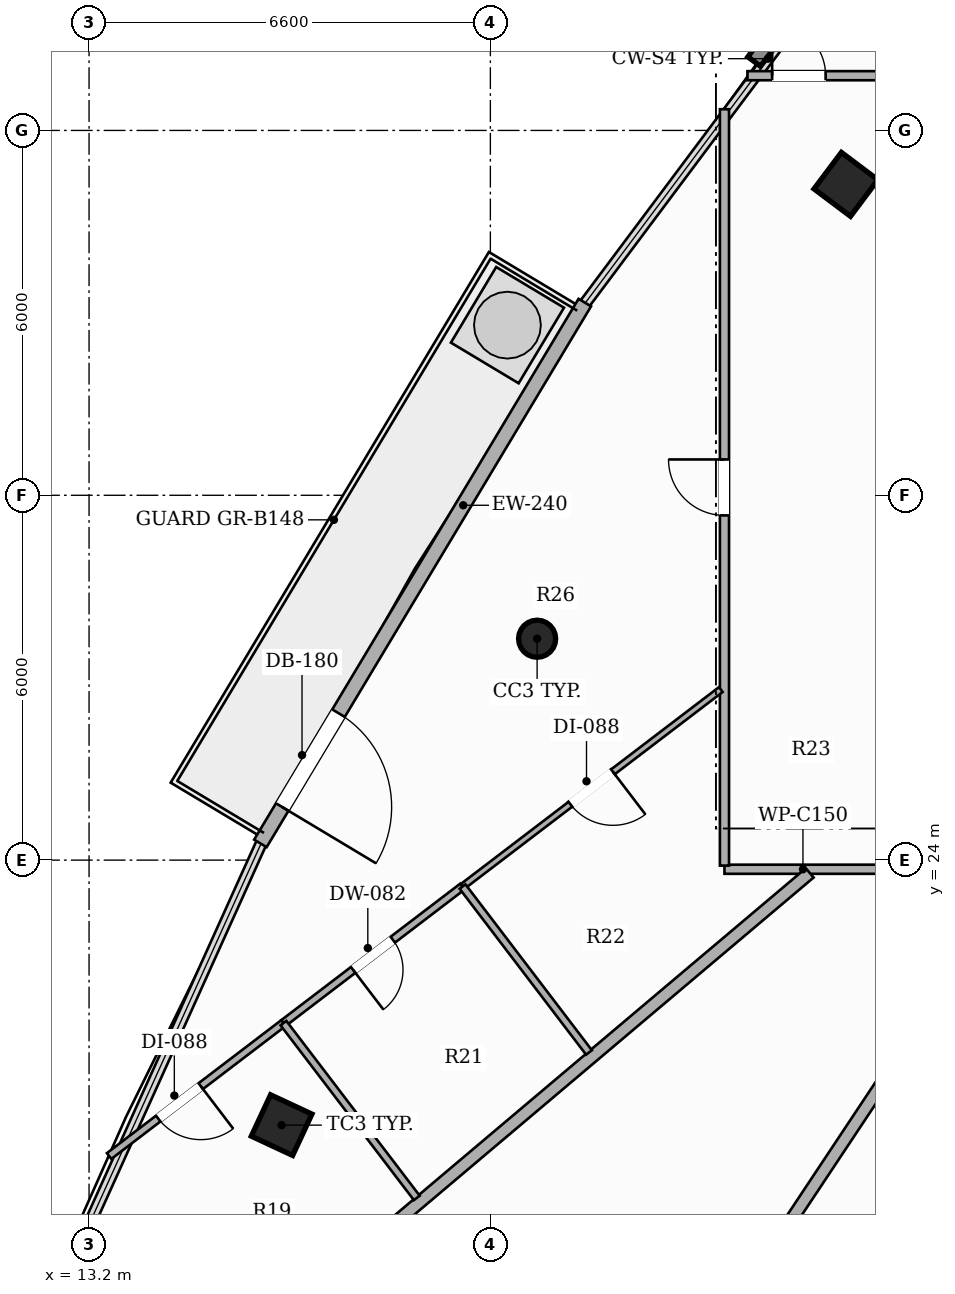
"""IFC4 building model, lengths in metres.
Left out: names, types, materials, properties, quantities, classifications, styles, units other than length and angle.
Written with IfcOpenShell. Run it as: python <this file> out.ifc"""

import sys

from ifc_helpers import new_model, si_unit, direction, frame, frame_2d, origin, origin_2d, place, context, subcontext, project, spatial, rectangle, hollow_rectangle, hollow_circle, extrude, element, fill, save


model = new_model("IFC4")
c1 = context("Model", 3, precision=1e-05, world=origin(), true_north=direction((0.0, 1.0)))
c2 = subcontext(c1, "Body", "Model", "MODEL_VIEW")
j1 = project(units=[si_unit("LENGTHUNIT", "METRE"), si_unit("PLANEANGLEUNIT", "RADIAN")], contexts=[c1])
p1 = place(None, origin())
s1 = spatial("IfcSite", under=j1, at=p1, CompositionType="ELEMENT")
p2 = place(p1, origin())
s2 = spatial("IfcBuilding", under=s1, at=p2, CompositionType="ELEMENT")
p3 = place(p2, frame((0.0, 0.0, 212.9)))
s3 = spatial("IfcBuildingStorey", under=s2, at=p3, CompositionType="ELEMENT", Elevation=212.9)
p4 = place(p3, frame((25.648, 35.113, 0.0), z_axis=(0.0, 0.0, 1.0), x_axis=(0.600420225326, 0.799684658487, 0.0)))
e1 = element("IfcColumn", 1, at=p4, inside=s3, PredefinedType="COLUMN", context=c2, shape_type="SweptSolid", body=[
    extrude(hollow_rectangle(XDim=0.75, YDim=0.75, WallThickness=0.025, at=origin_2d()), origin(), (0.0, 0.0, 1.0), 3.3),
])
p5 = place(p3, frame((20.569, 27.641, 0.0), z_axis=(0.0, 0.0, 1.0), x_axis=(1.0, 0.0, 0.0)))
e2 = element("IfcColumn", 2, at=p5, inside=s3, PredefinedType="COLUMN", context=c2, shape_type="SweptSolid", body=[
    extrude(hollow_circle(Radius=0.305, WallThickness=0.016, at=origin_2d()), origin(), (0.0, 0.0, 1.0), 3.3),
])
p6 = place(p3, frame((16.367, 19.642, 0.0), z_axis=(0.0, 0.0, 1.0), x_axis=(0.422618261741, 0.906307787037, 0.0)))
e3 = element("IfcColumn", 3, at=p6, inside=s3, PredefinedType="COLUMN", context=c2, shape_type="SweptSolid", body=[
    extrude(hollow_rectangle(XDim=0.75, YDim=0.75, WallThickness=0.025, at=origin_2d()), origin(), (0.0, 0.0, 1.0), 3.3),
])
p7 = place(p3, frame((21.353, 33.169, 0.0), z_axis=(0.0, 0.0, 1.0), x_axis=(-0.514391899557, -0.857555230682, 0.0)))
e4 = element("IfcWall", 4, at=p7, inside=s3, PredefinedType="SOLIDWALL", context=c2, shape_type="SweptSolid", body=[
    extrude(rectangle(XDim=10.371, YDim=0.24, at=frame_2d((5.186, 0.0))), origin(), (0.0, 0.0, 1.0), 2.624),
])
p8 = place(p7, frame((7.874, 0.0, 0.0)))
e5 = element("IfcOpeningElement", 5, at=p8, cuts=e4, PredefinedType="OPENING", context=c2, shape_type="SweptSolid", body=[
    extrude(rectangle(XDim=1.8, YDim=2.2, at=frame_2d((0.9, 1.1))), frame((0.0, 0.13, 0.0), z_axis=(0.0, -1.0, 0.0), x_axis=(1.0, 0.0, 0.0)), (0.0, 0.0, 1.0), 0.26),
])
p9 = place(p3, frame((32.05, 23.85, 0.0), z_axis=(0.0, 0.0, 1.0), x_axis=(-1.0, 0.0, 0.0)))
e6 = element("IfcWall", 6, at=p9, inside=s3, PredefinedType="PARTITIONING", context=c2, shape_type="SweptSolid", body=[
    extrude(rectangle(XDim=8.4, YDim=0.15, at=frame_2d((4.2, 0.0))), origin(), (0.0, 0.0, 1.0), 2.565),
])
p10 = place(p9, frame((1.446, 0.0, 0.0)))
e7 = element("IfcOpeningElement", 7, at=p10, cuts=e6, PredefinedType="OPENING", context=c2, shape_type="SweptSolid", body=[
    extrude(rectangle(XDim=0.92, YDim=2.15, at=frame_2d((0.46, 1.075))), frame((0.0, 0.085, 0.0), z_axis=(0.0, -1.0, 0.0), x_axis=(1.0, 0.0, 0.0)), (0.0, 0.0, 1.0), 0.17),
])
p11 = place(p9, frame((4.798, 0.0, 0.0)))
e8 = element("IfcOpeningElement", 8, at=p11, cuts=e6, PredefinedType="OPENING", context=c2, shape_type="SweptSolid", body=[
    extrude(rectangle(XDim=0.92, YDim=2.15, at=frame_2d((0.46, 1.075))), frame((0.0, 0.085, 0.0), z_axis=(0.0, -1.0, 0.0), x_axis=(1.0, 0.0, 0.0)), (0.0, 0.0, 1.0), 0.17),
])
p12 = place(p3, frame((23.65, 23.91, 0.0), z_axis=(0.0, 0.0, 1.0), x_axis=(0.0, 1.0, 0.0)))
e9 = element("IfcWall", 9, at=p12, inside=s3, PredefinedType="PARTITIONING", context=c2, shape_type="SweptSolid", body=[
    extrude(rectangle(XDim=12.439, YDim=0.15, at=frame_2d((6.22, 0.0))), origin(), (0.0, 0.0, 1.0), 2.492),
])
p13 = place(p12, frame((5.759, 0.0, 0.0)))
e10 = element("IfcOpeningElement", 10, at=p13, cuts=e9, PredefinedType="OPENING", context=c2, shape_type="SweptSolid", body=[
    extrude(rectangle(XDim=0.92, YDim=2.15, at=frame_2d((0.46, 1.075))), frame((0.0, 0.085, 0.0), z_axis=(0.0, -1.0, 0.0), x_axis=(1.0, 0.0, 0.0)), (0.0, 0.0, 1.0), 0.17),
])
p14 = place(p3, frame((24.028, 36.9, 0.0), z_axis=(0.0, 0.0, 1.0), x_axis=(1.0, 0.0, 0.0)))
e11 = element("IfcWall", 11, at=p14, inside=s3, PredefinedType="PARTITIONING", context=c2, shape_type="SweptSolid", body=[
    extrude(rectangle(XDim=2.122, YDim=0.15, at=frame_2d((1.061, 0.0))), origin(), (0.0, 0.0, 1.0), 2.619),
])
p15 = place(p14, frame((0.406, 0.0, 0.0)))
e12 = element("IfcOpeningElement", 12, at=p15, cuts=e11, PredefinedType="OPENING", context=c2, shape_type="SweptSolid", body=[
    extrude(rectangle(XDim=0.88, YDim=2.1, at=frame_2d((0.44, 1.05))), frame((0.0, 0.085, 0.0), z_axis=(0.0, -1.0, 0.0), x_axis=(1.0, 0.0, 0.0)), (0.0, 0.0, 1.0), 0.17),
])
p16 = place(p3, frame((16.618, 5.846, 0.0), z_axis=(0.0, 0.0, 1.0), x_axis=(0.553425992232, 0.832898355817, 0.0)))
e13 = element("IfcWall", 13, at=p16, inside=s3, PredefinedType="PARTITIONING", context=c2, shape_type="SweptSolid", body=[
    extrude(rectangle(XDim=21.544, YDim=0.2, at=frame_2d((10.772, 0.0))), origin(), (0.0, 0.0, 1.0), 2.492),
])
p17 = place(p3, frame((10.087, 11.156, 0.0), z_axis=(0.0, 0.0, 1.0), x_axis=(0.76410924632, 0.645086862127, 0.0)))
e14 = element("IfcWall", 14, at=p17, inside=s3, PredefinedType="PARTITIONING", context=c2, shape_type="SweptSolid", body=[
    extrude(rectangle(XDim=19.585, YDim=0.2, at=frame_2d((9.792, 0.0))), origin(), (0.0, 0.0, 1.0), 2.492),
])
p18 = place(p3, frame((19.342, 23.566, 0.0), z_axis=(0.0, 0.0, 1.0), x_axis=(-0.795172892053, -0.606382776589, 0.0)))
e15 = element("IfcWall", 15, at=p18, inside=s3, PredefinedType="PARTITIONING", context=c2, shape_type="SweptSolid", body=[
    extrude(rectangle(XDim=3.704, YDim=0.12, at=frame_2d((1.852, 0.0))), origin(), (0.0, 0.0, 1.0), 2.492),
])
p19 = place(p18, frame((1.442, 0.0, 0.0)))
e16 = element("IfcOpeningElement", 16, at=p19, cuts=e15, PredefinedType="OPENING", context=c2, shape_type="SweptSolid", body=[
    extrude(rectangle(XDim=0.82, YDim=2.1, at=frame_2d((0.41, 1.05))), frame((0.0, 0.07, 0.0), z_axis=(0.0, -1.0, 0.0), x_axis=(1.0, 0.0, 0.0)), (0.0, 0.0, 1.0), 0.14),
])
p20 = place(p3, frame((16.397, 21.32, 0.0), z_axis=(0.0, 0.0, 1.0), x_axis=(-0.795204709159, -0.606341051333, 0.0)))
e17 = element("IfcWall", 17, at=p20, inside=s3, PredefinedType="PARTITIONING", context=c2, shape_type="SweptSolid", body=[
    extrude(rectangle(XDim=3.605, YDim=0.12, at=frame_2d((1.803, 0.0))), origin(), (0.0, 0.0, 1.0), 3.06),
])
p21 = place(p20, frame((1.71, 0.0, 0.0)))
e18 = element("IfcOpeningElement", 18, at=p21, cuts=e17, PredefinedType="OPENING", context=c2, shape_type="SweptSolid", body=[
    extrude(rectangle(XDim=0.88, YDim=2.1, at=frame_2d((0.44, 1.05))), frame((0.0, 0.07, 0.0), z_axis=(0.0, -1.0, 0.0), x_axis=(1.0, 0.0, 0.0)), (0.0, 0.0, 1.0), 0.14),
])
p22 = place(p3, frame((23.59, 26.805, 0.0), z_axis=(0.0, 0.0, 1.0), x_axis=(-0.795214502583, -0.606328207228, 0.0)))
e19 = element("IfcWall", 19, at=p22, inside=s3, PredefinedType="PARTITIONING", context=c2, shape_type="SweptSolid", body=[
    extrude(rectangle(XDim=5.342, YDim=0.1, at=frame_2d((2.671, 0.0))), origin(), (0.0, 0.0, 1.0), 2.773),
])
p23 = place(p22, frame((2.231, 0.0, 0.0)))
e20 = element("IfcOpeningElement", 20, at=p23, cuts=e19, PredefinedType="OPENING", context=c2, shape_type="SweptSolid", body=[
    extrude(rectangle(XDim=0.88, YDim=2.1, at=frame_2d((0.44, 1.05))), frame((0.0, 0.06, 0.0), z_axis=(0.0, -1.0, 0.0), x_axis=(1.0, 0.0, 0.0)), (0.0, 0.0, 1.0), 0.12),
])
p24 = place(p3, frame((18.59, 18.445, 0.0), z_axis=(0.0, 0.0, 1.0), x_axis=(-0.606504882674, 0.795079761591, 0.0)))
e21 = element("IfcWall", 21, at=p24, inside=s3, PredefinedType="PARTITIONING", context=c2, shape_type="SweptSolid", body=[
    extrude(rectangle(XDim=3.616, YDim=0.12, at=frame_2d((1.808, 0.0))), origin(), (0.0, 0.0, 1.0), 2.492),
])
p25 = place(p3, frame((19.342, 23.566, 0.0), z_axis=(0.0, 0.0, 1.0), x_axis=(0.60619754922, -0.795314108589, 0.0)))
e22 = element("IfcWall", 22, at=p25, inside=s3, PredefinedType="PARTITIONING", context=c2, shape_type="SweptSolid", body=[
    extrude(rectangle(XDim=3.431, YDim=0.12, at=frame_2d((1.716, 0.0))), origin(), (0.0, 0.0, 1.0), 2.773),
])
p26 = place(p8, origin())
e23 = element("IfcDoor", 23, at=p26, inside=s3, OperationType="SINGLE_SWING_RIGHT", PredefinedType="DOOR", context=c2, shape_type="SweptSolid", body=[
    extrude(rectangle(XDim=1.8, YDim=2.2, at=frame_2d((0.9, 1.1))), frame((0.0, 0.025, 0.0), z_axis=(0.0, -1.0, 0.0), x_axis=(1.0, 0.0, 0.0)), (0.0, 0.0, 1.0), 0.05),
])
fill(e5, e23)
p27 = place(p13, origin())
e24 = element("IfcDoor", 24, at=p27, inside=s3, OperationType="SINGLE_SWING_RIGHT", PredefinedType="DOOR", context=c2, shape_type="SweptSolid", body=[
    extrude(rectangle(XDim=0.92, YDim=2.15, at=frame_2d((0.46, 1.075))), frame((0.0, 0.025, 0.0), z_axis=(0.0, -1.0, 0.0), x_axis=(1.0, 0.0, 0.0)), (0.0, 0.0, 1.0), 0.05),
])
fill(e10, e24)
p28 = place(p19, origin())
e25 = element("IfcDoor", 25, at=p28, inside=s3, OperationType="SINGLE_SWING_RIGHT", PredefinedType="DOOR", context=c2, shape_type="SweptSolid", body=[
    extrude(rectangle(XDim=0.82, YDim=2.1, at=frame_2d((0.41, 1.05))), frame((0.0, 0.025, 0.0), z_axis=(0.0, -1.0, 0.0), x_axis=(1.0, 0.0, 0.0)), (0.0, 0.0, 1.0), 0.05),
])
fill(e16, e25)
p29 = place(p21, origin())
e26 = element("IfcDoor", 26, at=p29, inside=s3, OperationType="SINGLE_SWING_LEFT", PredefinedType="DOOR", context=c2, shape_type="SweptSolid", body=[
    extrude(rectangle(XDim=0.88, YDim=2.1, at=frame_2d((0.44, 1.05))), frame((0.0, 0.025, 0.0), z_axis=(0.0, -1.0, 0.0), x_axis=(1.0, 0.0, 0.0)), (0.0, 0.0, 1.0), 0.05),
])
fill(e18, e26)
p30 = place(p23, origin())
e27 = element("IfcDoor", 27, at=p30, inside=s3, OperationType="SINGLE_SWING_LEFT", PredefinedType="DOOR", context=c2, shape_type="SweptSolid", body=[
    extrude(rectangle(XDim=0.88, YDim=2.1, at=frame_2d((0.44, 1.05))), frame((0.0, 0.025, 0.0), z_axis=(0.0, -1.0, 0.0), x_axis=(1.0, 0.0, 0.0)), (0.0, 0.0, 1.0), 0.05),
])
fill(e20, e27)
p31 = place(p15, origin())
e28 = element("IfcDoor", 28, at=p31, inside=s3, OperationType="SINGLE_SWING_LEFT", PredefinedType="DOOR", context=c2, shape_type="SweptSolid", body=[
    extrude(rectangle(XDim=0.88, YDim=2.1, at=frame_2d((0.44, 1.05))), frame((0.0, 0.025, 0.0), z_axis=(0.0, -1.0, 0.0), x_axis=(1.0, 0.0, 0.0)), (0.0, 0.0, 1.0), 0.05),
])
fill(e12, e28)
save(model, sys.argv[1])
